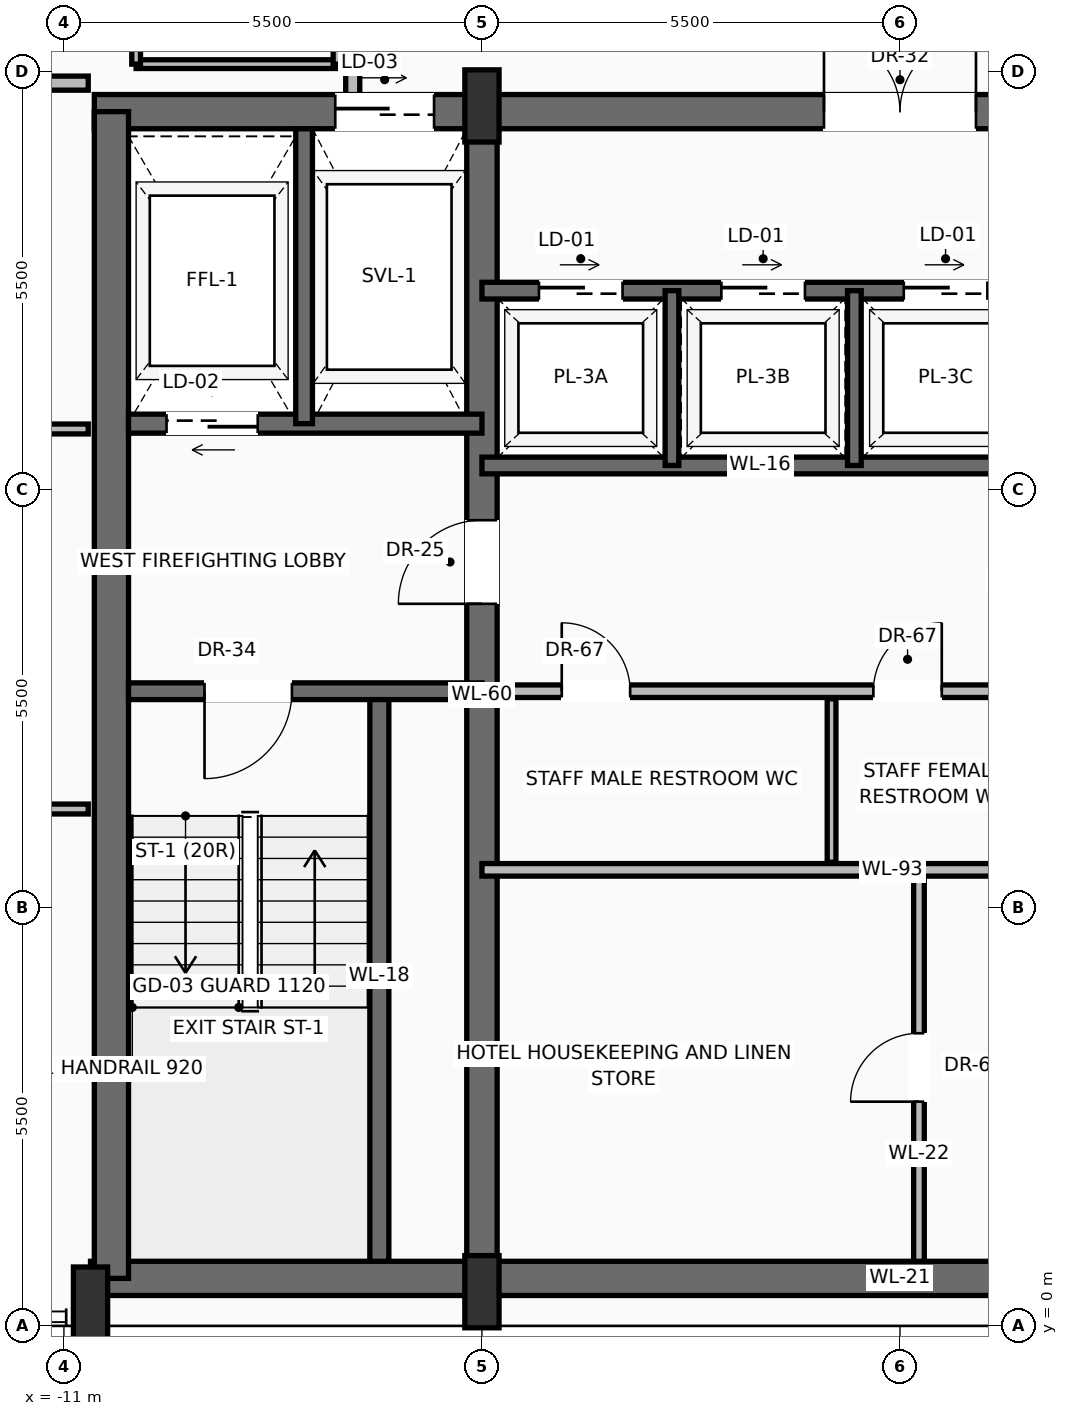
"""IFC4 building model, lengths in metres.
Left out: names, types, materials, properties, quantities, classifications, styles, units other than length and angle.
Written with IfcOpenShell. Run it as: python <this file> out.ifc"""

import sys

from ifc_helpers import new_model, si_unit, direction, frame, frame_2d, origin, origin_2d, place, context, subcontext, project, spatial, rectangle, extrude, source, transform, mapped, element, fill, save


model = new_model("IFC4")
c1 = context("Model", 3, precision=1e-05, world=origin(), true_north=direction((0.0, 1.0)))
c2 = subcontext(c1, "Body", "Model", "MODEL_VIEW")
j1 = project(units=[si_unit("LENGTHUNIT", "METRE"), si_unit("PLANEANGLEUNIT", "RADIAN")], contexts=[c1])
p1 = place(None, origin())
s1 = spatial("IfcSite", under=j1, at=p1, CompositionType="ELEMENT")
p2 = place(p1, origin())
s2 = spatial("IfcBuilding", under=s1, at=p2, CompositionType="ELEMENT")
p3 = place(p2, frame((0.0, 0.0, 286.8)))
s3 = spatial("IfcBuildingStorey", under=s2, at=p3, CompositionType="ELEMENT", Elevation=286.8)
p4 = place(p3, frame((-10.65, 0.625, 0.0), z_axis=(0.0, 0.0, 1.0), x_axis=(1.0, 0.0, 0.0)))
e1 = element("IfcWall", 1, at=p4, inside=s3, PredefinedType="SHEAR", context=c2, shape_type="SweptSolid", body=[
    extrude(rectangle(XDim=21.3, YDim=0.45, at=frame_2d((10.65, 0.0))), origin(), (0.0, 0.0, 1.0), 3.24),
])
p5 = place(p3, frame((-10.6, 15.975, 0.0), z_axis=(0.0, 0.0, 1.0), x_axis=(1.0, 0.0, 0.0)))
e2 = element("IfcWall", 2, at=p5, inside=s3, PredefinedType="SHEAR", context=c2, shape_type="SweptSolid", body=[
    extrude(rectangle(XDim=21.2, YDim=0.45, at=frame_2d((10.6, 0.0))), origin(), (0.0, 0.0, 1.0), 3.24),
])
p6 = place(p5, frame((3.17, 0.0, 0.0)))
e3 = element("IfcOpeningElement", 3, at=p6, cuts=e2, PredefinedType="OPENING", context=c2, shape_type="SweptSolid", body=[
    extrude(rectangle(XDim=1.3, YDim=2.3, at=frame_2d((0.65, 1.15))), frame((0.0, 0.235, 0.0), z_axis=(0.0, -1.0, 0.0), x_axis=(1.0, 0.0, 0.0)), (0.0, 0.0, 1.0), 0.47),
])
p7 = place(p5, frame((9.6, 0.0, 0.0)))
e4 = element("IfcOpeningElement", 4, at=p7, cuts=e2, PredefinedType="OPENING", context=c2, shape_type="SweptSolid", body=[
    extrude(rectangle(XDim=2.0, YDim=2.4, at=frame_2d((1.0, 1.2))), frame((0.0, 0.235, 0.0), z_axis=(0.0, -1.0, 0.0), x_axis=(1.0, 0.0, 0.0)), (0.0, 0.0, 1.0), 0.47),
])
p8 = place(p3, frame((-10.375, 0.625, 0.0), z_axis=(0.0, 0.0, 1.0), x_axis=(0.0, 1.0, 0.0)))
e5 = element("IfcWall", 5, at=p8, inside=s3, PredefinedType="SHEAR", context=c2, shape_type="SweptSolid", body=[
    extrude(rectangle(XDim=15.35, YDim=0.45, at=frame_2d((7.675, 0.0))), origin(), (0.0, 0.0, 1.0), 3.24),
])
p9 = place(p3, frame((-5.5, 0.625, 0.0), z_axis=(0.0, 0.0, 1.0), x_axis=(0.0, 1.0, 0.0)))
e6 = element("IfcWall", 6, at=p9, inside=s3, PredefinedType="SHEAR", context=c2, shape_type="SweptSolid", body=[
    extrude(rectangle(XDim=15.35, YDim=0.4, at=frame_2d((7.675, 0.0))), origin(), (0.0, 0.0, 1.0), 3.24),
])
p10 = place(p9, frame((8.875, 0.0, 0.0)))
e7 = element("IfcOpeningElement", 7, at=p10, cuts=e6, PredefinedType="OPENING", context=c2, shape_type="SweptSolid", body=[
    extrude(rectangle(XDim=1.1, YDim=2.2, at=frame_2d((0.55, 1.1))), frame((0.0, 0.21, 0.0), z_axis=(0.0, -1.0, 0.0), x_axis=(1.0, 0.0, 0.0)), (0.0, 0.0, 1.0), 0.42),
])
m1 = source(origin(), c2, "Body", "SweptSolid", [
    extrude(rectangle(XDim=0.45, YDim=0.95, at=origin_2d()), origin(), (0.0, 0.0, 1.0), 3.45),
])
for number, where, z_axis, x_axis in (
    (8, (-10.65, 0.3, 0.0), (0.0, 0.0, 1.0), (1.0, 0.0, 0.0)),
    (9, (-5.5, 0.45, 0.0), (0.0, 0.0, 1.0), (1.0, 0.0, 0.0)),
    (10, (-5.5, 16.05, 0.0), (0.0, 0.0, 1.0), (1.0, 0.0, 0.0)),
):
    element("IfcColumn", number, at=place(p3, frame(where, z_axis=z_axis, x_axis=x_axis)), inside=s3, PredefinedType="PILASTER", context=c2, shape_type="MappedRepresentation", body=[
        mapped(m1, transform((0.0, 0.0, 0.0), scale=1.0)),
    ])
p11 = place(p3, frame((-18.148, 13.993, 0.0), z_axis=(0.0, 0.0, 1.0), x_axis=(0.498516004102, 0.866880495601, 0.0)))
e11 = element("IfcWall", 11, at=p11, inside=s3, PredefinedType="SOLIDWALL", context=c2, shape_type="SweptSolid", body=[
    extrude(rectangle(XDim=20.236, YDim=0.28, at=frame_2d((10.118, 0.0))), origin(), (0.0, 0.0, 1.0), 2.82),
])
p12 = place(p11, frame((4.857, 0.0, 0.0)))
e12 = element("IfcOpeningElement", 12, at=p12, cuts=e11, PredefinedType="OPENING", context=c2, shape_type="SweptSolid", body=[
    extrude(rectangle(XDim=1.6, YDim=2.35, at=frame_2d((0.8, 1.175))), frame((0.0, 0.15, 0.0), z_axis=(0.0, -1.0, 0.0), x_axis=(1.0, 0.0, 0.0)), (0.0, 0.0, 1.0), 0.3),
])
p13 = place(p11, frame((13.761, 0.0, 0.9)))
e13 = element("IfcOpeningElement", 13, at=p13, cuts=e11, PredefinedType="OPENING", context=c2, shape_type="SweptSolid", body=[
    extrude(rectangle(XDim=1.55, YDim=1.75, at=frame_2d((0.775, 0.875))), frame((0.0, 0.15, 0.0), z_axis=(0.0, -1.0, 0.0), x_axis=(1.0, 0.0, 0.0)), (0.0, 0.0, 1.0), 0.3),
])
p14 = place(p3, frame((-6.85, 0.85, 0.0), z_axis=(0.0, 0.0, 1.0), x_axis=(0.0, 1.0, 0.0)))
e14 = element("IfcWall", 14, at=p14, inside=s3, PredefinedType="SOLIDWALL", context=c2, shape_type="SweptSolid", body=[
    extrude(rectangle(XDim=7.5, YDim=0.25, at=frame_2d((3.75, 0.0))), origin(), (0.0, 0.0, 1.0), 3.24),
])
p15 = place(p3, frame((-5.5, 8.35, 0.0), z_axis=(0.0, 0.0, 1.0), x_axis=(-1.0, 0.0, 0.0)))
e15 = element("IfcWall", 15, at=p15, inside=s3, PredefinedType="SOLIDWALL", context=c2, shape_type="SweptSolid", body=[
    extrude(rectangle(XDim=4.65, YDim=0.22, at=frame_2d((2.325, 0.0))), origin(), (0.0, 0.0, 1.0), 3.24),
])
p16 = place(p15, frame((2.5, 0.0, 0.0)))
e16 = element("IfcOpeningElement", 16, at=p16, cuts=e15, PredefinedType="OPENING", context=c2, shape_type="SweptSolid", body=[
    extrude(rectangle(XDim=1.15, YDim=2.2, at=frame_2d((0.575, 1.1))), frame((0.0, 0.12, 0.0), z_axis=(0.0, -1.0, 0.0), x_axis=(1.0, 0.0, 0.0)), (0.0, 0.0, 1.0), 0.24),
])
p17 = place(p3, frame((-5.5, 11.87, 0.0), z_axis=(0.0, 0.0, 1.0), x_axis=(-1.0, 0.0, 0.0)))
e17 = element("IfcWall", 17, at=p17, inside=s3, PredefinedType="SOLIDWALL", context=c2, shape_type="SweptSolid", body=[
    extrude(rectangle(XDim=4.65, YDim=0.25, at=frame_2d((2.325, 0.0))), origin(), (0.0, 0.0, 1.0), 3.24),
])
p18 = place(p17, frame((2.95, 0.0, 0.0)))
e18 = element("IfcOpeningElement", 18, at=p18, cuts=e17, PredefinedType="OPENING", context=c2, shape_type="SweptSolid", body=[
    extrude(rectangle(XDim=1.2, YDim=2.25, at=frame_2d((0.6, 1.125))), frame((0.0, 0.135, 0.0), z_axis=(0.0, -1.0, 0.0), x_axis=(1.0, 0.0, 0.0)), (0.0, 0.0, 1.0), 0.27),
])
p19 = place(p3, frame((-7.84, 11.87, 0.0), z_axis=(0.0, 0.0, 1.0), x_axis=(0.0, 1.0, 0.0)))
e19 = element("IfcWall", 19, at=p19, inside=s3, PredefinedType="SOLIDWALL", context=c2, shape_type="SweptSolid", body=[
    extrude(rectangle(XDim=3.88, YDim=0.22, at=frame_2d((1.94, 0.0))), origin(), (0.0, 0.0, 1.0), 3.24),
])
p20 = place(p3, frame((-5.5, 6.0, 0.0), z_axis=(0.0, 0.0, 1.0), x_axis=(1.0, 0.0, 0.0)))
e20 = element("IfcWall", 20, at=p20, inside=s3, PredefinedType="PARTITIONING", context=c2, shape_type="SweptSolid", body=[
    extrude(rectangle(XDim=10.8, YDim=0.165, at=frame_2d((5.4, 0.0))), origin(), (0.0, 0.0, 1.0), 3.232),
])
p21 = place(p20, frame((7.7, 0.0, 0.0)))
e21 = element("IfcOpeningElement", 21, at=p21, cuts=e20, PredefinedType="OPENING", context=c2, shape_type="SweptSolid", body=[
    extrude(rectangle(XDim=0.9, YDim=2.1, at=frame_2d((0.45, 1.05))), frame((0.0, 0.093, 0.0), z_axis=(0.0, -1.0, 0.0), x_axis=(1.0, 0.0, 0.0)), (0.0, 0.0, 1.0), 0.185),
])
p22 = place(p3, frame((0.25, 0.85, 0.0), z_axis=(0.0, 0.0, 1.0), x_axis=(0.0, 1.0, 0.0)))
e22 = element("IfcWall", 22, at=p22, inside=s3, PredefinedType="PARTITIONING", context=c2, shape_type="SweptSolid", body=[
    extrude(rectangle(XDim=5.03, YDim=0.14, at=frame_2d((2.515, 0.0))), origin(), (0.0, 0.0, 1.0), 3.232),
])
p23 = place(p22, frame((2.1, 0.0, 0.0)))
e23 = element("IfcOpeningElement", 23, at=p23, cuts=e22, PredefinedType="OPENING", context=c2, shape_type="SweptSolid", body=[
    extrude(rectangle(XDim=0.9, YDim=2.1, at=frame_2d((0.45, 1.05))), frame((0.0, 0.08, 0.0), z_axis=(0.0, -1.0, 0.0), x_axis=(1.0, 0.0, 0.0)), (0.0, 0.0, 1.0), 0.16),
])
p24 = place(p3, frame((-5.3, 8.35, 0.0), z_axis=(0.0, 0.0, 1.0), x_axis=(1.0, 0.0, 0.0)))
e24 = element("IfcWall", 24, at=p24, inside=s3, PredefinedType="PARTITIONING", context=c2, shape_type="SweptSolid", body=[
    extrude(rectangle(XDim=7.12, YDim=0.165, at=frame_2d((3.56, 0.0))), origin(), (0.0, 0.0, 1.0), 3.232),
])
p25 = place(p24, frame((0.85, 0.0, 0.0)))
e25 = element("IfcOpeningElement", 25, at=p25, cuts=e24, PredefinedType="OPENING", context=c2, shape_type="SweptSolid", body=[
    extrude(rectangle(XDim=0.9, YDim=2.1, at=frame_2d((0.45, 1.05))), frame((0.0, 0.093, 0.0), z_axis=(0.0, -1.0, 0.0), x_axis=(1.0, 0.0, 0.0)), (0.0, 0.0, 1.0), 0.185),
])
p26 = place(p24, frame((4.95, 0.0, 0.0)))
e26 = element("IfcOpeningElement", 26, at=p26, cuts=e24, PredefinedType="OPENING", context=c2, shape_type="SweptSolid", body=[
    extrude(rectangle(XDim=0.9, YDim=2.1, at=frame_2d((0.45, 1.05))), frame((0.0, 0.093, 0.0), z_axis=(0.0, -1.0, 0.0), x_axis=(1.0, 0.0, 0.0)), (0.0, 0.0, 1.0), 0.185),
])
p27 = place(p3, frame((-0.9, 6.1, 0.0), z_axis=(0.0, 0.0, 1.0), x_axis=(0.0, 1.0, 0.0)))
e27 = element("IfcWall", 27, at=p27, inside=s3, PredefinedType="PARTITIONING", context=c2, shape_type="SweptSolid", body=[
    extrude(rectangle(XDim=2.15, YDim=0.115, at=frame_2d((1.075, 0.0))), origin(), (0.0, 0.0, 1.0), 3.232),
])
p28 = place(p3, frame((-5.5, 11.32, 0.0), z_axis=(0.0, 0.0, 1.0), x_axis=(1.0, 0.0, 0.0)))
e28 = element("IfcWall", 28, at=p28, inside=s3, PredefinedType="SOLIDWALL", context=c2, shape_type="SweptSolid", body=[
    extrude(rectangle(XDim=7.32, YDim=0.22, at=frame_2d((3.66, 0.0))), origin(), (0.0, 0.0, 1.0), 3.24),
])
p29 = place(p3, frame((-5.5, 13.62, 0.0), z_axis=(0.0, 0.0, 1.0), x_axis=(1.0, 0.0, 0.0)))
e29 = element("IfcWall", 29, at=p29, inside=s3, PredefinedType="SOLIDWALL", context=c2, shape_type="SweptSolid", body=[
    extrude(rectangle(XDim=7.32, YDim=0.22, at=frame_2d((3.66, 0.0))), origin(), (0.0, 0.0, 1.0), 3.24),
])
p30 = place(p29, frame((0.75, 0.0, 0.0)))
e30 = element("IfcOpeningElement", 30, at=p30, cuts=e29, PredefinedType="OPENING", context=c2, shape_type="SweptSolid", body=[
    extrude(rectangle(XDim=1.1, YDim=2.2, at=frame_2d((0.55, 1.1))), frame((0.0, 0.12, 0.0), z_axis=(0.0, -1.0, 0.0), x_axis=(1.0, 0.0, 0.0)), (0.0, 0.0, 1.0), 0.24),
])
p31 = place(p29, frame((3.15, 0.0, 0.0)))
e31 = element("IfcOpeningElement", 31, at=p31, cuts=e29, PredefinedType="OPENING", context=c2, shape_type="SweptSolid", body=[
    extrude(rectangle(XDim=1.1, YDim=2.2, at=frame_2d((0.55, 1.1))), frame((0.0, 0.12, 0.0), z_axis=(0.0, -1.0, 0.0), x_axis=(1.0, 0.0, 0.0)), (0.0, 0.0, 1.0), 0.24),
])
p32 = place(p29, frame((5.55, 0.0, 0.0)))
e32 = element("IfcOpeningElement", 32, at=p32, cuts=e29, PredefinedType="OPENING", context=c2, shape_type="SweptSolid", body=[
    extrude(rectangle(XDim=1.1, YDim=2.2, at=frame_2d((0.55, 1.1))), frame((0.0, 0.12, 0.0), z_axis=(0.0, -1.0, 0.0), x_axis=(1.0, 0.0, 0.0)), (0.0, 0.0, 1.0), 0.24),
])
for number, where, z_axis, x_axis in (
    (33, (-3.0, 11.32, 0.0), (0.0, 0.0, 1.0), (0.0, 1.0, 0.0)),
    (34, (-0.6, 11.32, 0.0), (0.0, 0.0, 1.0), (0.0, 1.0, 0.0)),
):
    element("IfcWall", number, at=place(p3, frame(where, z_axis=z_axis, x_axis=x_axis)), inside=s3, PredefinedType="SOLIDWALL", context=c2, shape_type="SweptSolid", body=[
        extrude(rectangle(XDim=2.3, YDim=0.18, at=frame_2d((1.15, 0.0))), origin(), (0.0, 0.0, 1.0), 3.24),
    ])
p33 = place(p3, frame((-7.2, 16.2, 0.0), z_axis=(0.0, 0.0, 1.0), x_axis=(0.0, 1.0, 0.0)))
e35 = element("IfcWall", 35, at=p33, inside=s3, PredefinedType="PARTITIONING", context=c2, shape_type="SweptSolid", body=[
    extrude(rectangle(XDim=10.4, YDim=0.185, at=frame_2d((5.2, 0.0))), origin(), (0.0, 0.0, 1.0), 3.232),
])
p34 = place(p33, frame((3.18, 0.0, 0.0)))
e36 = element("IfcOpeningElement", 36, at=p34, cuts=e35, PredefinedType="OPENING", context=c2, shape_type="SweptSolid", body=[
    extrude(rectangle(XDim=1.05, YDim=2.25, at=frame_2d((0.525, 1.125))), frame((0.0, 0.103, 0.0), z_axis=(0.0, -1.0, 0.0), x_axis=(1.0, 0.0, 0.0)), (0.0, 0.0, 1.0), 0.205),
])
p35 = place(p33, frame((7.712, 0.0, 0.0)))
e37 = element("IfcOpeningElement", 37, at=p35, cuts=e35, PredefinedType="OPENING", context=c2, shape_type="SweptSolid", body=[
    extrude(rectangle(XDim=1.05, YDim=2.25, at=frame_2d((0.525, 1.125))), frame((0.0, 0.103, 0.0), z_axis=(0.0, -1.0, 0.0), x_axis=(1.0, 0.0, 0.0)), (0.0, 0.0, 1.0), 0.205),
])
p36 = place(p3, frame((-16.943, 16.35, 0.0), z_axis=(0.0, 0.0, 1.0), x_axis=(1.0, 0.0, 0.0)))
e38 = element("IfcWall", 38, at=p36, inside=s3, PredefinedType="PARTITIONING", context=c2, shape_type="SweptSolid", body=[
    extrude(rectangle(XDim=6.263, YDim=0.185, at=frame_2d((3.132, 0.0))), origin(), (0.0, 0.0, 1.0), 3.232),
])
p37 = place(p36, frame((3.444, 0.0, 0.0)))
e39 = element("IfcOpeningElement", 39, at=p37, cuts=e38, PredefinedType="OPENING", context=c2, shape_type="SweptSolid", body=[
    extrude(rectangle(XDim=1.05, YDim=2.25, at=frame_2d((0.525, 1.125))), frame((0.0, 0.103, 0.0), z_axis=(0.0, -1.0, 0.0), x_axis=(1.0, 0.0, 0.0)), (0.0, 0.0, 1.0), 0.205),
])
p38 = place(p3, frame((-22.435, 6.8, 0.0), z_axis=(0.0, 0.0, 1.0), x_axis=(1.0, 0.0, 0.0)))
e40 = element("IfcWall", 40, at=p38, inside=s3, PredefinedType="PARTITIONING", context=c2, shape_type="SweptSolid", body=[
    extrude(rectangle(XDim=11.755, YDim=0.13, at=frame_2d((5.877, 0.0))), origin(), (0.0, 0.0, 1.0), 3.232),
])
p39 = place(p38, frame((4.849, 0.0, 0.0)))
e41 = element("IfcOpeningElement", 41, at=p39, cuts=e40, PredefinedType="OPENING", context=c2, shape_type="SweptSolid", body=[
    extrude(rectangle(XDim=0.95, YDim=2.2, at=frame_2d((0.475, 1.1))), frame((0.0, 0.075, 0.0), z_axis=(0.0, -1.0, 0.0), x_axis=(1.0, 0.0, 0.0)), (0.0, 0.0, 1.0), 0.15),
])
p40 = place(p3, frame((-19.56, 11.8, 0.0), z_axis=(0.0, 0.0, 1.0), x_axis=(1.0, 0.0, 0.0)))
e42 = element("IfcWall", 42, at=p40, inside=s3, PredefinedType="PARTITIONING", context=c2, shape_type="SweptSolid", body=[
    extrude(rectangle(XDim=8.88, YDim=0.13, at=frame_2d((4.44, 0.0))), origin(), (0.0, 0.0, 1.0), 3.232),
])
p41 = place(p40, frame((3.555, 0.0, 0.0)))
e43 = element("IfcOpeningElement", 43, at=p41, cuts=e42, PredefinedType="OPENING", context=c2, shape_type="SweptSolid", body=[
    extrude(rectangle(XDim=0.95, YDim=2.2, at=frame_2d((0.475, 1.1))), frame((0.0, 0.075, 0.0), z_axis=(0.0, -1.0, 0.0), x_axis=(1.0, 0.0, 0.0)), (0.0, 0.0, 1.0), 0.15),
])
p42 = place(p3, frame((-10.05, 16.6, 0.0), z_axis=(0.0, 0.0, 1.0), x_axis=(1.0, 0.0, 0.0)))
e44 = element("IfcWall", 44, at=p42, inside=s3, PredefinedType="PARTITIONING", context=c2, shape_type="SweptSolid", body=[
    extrude(rectangle(XDim=2.65, YDim=0.115, at=frame_2d((1.325, 0.0))), origin(), (0.0, 0.0, 1.0), 3.232),
])
p43 = place(p3, frame((-10.05, 16.6, 0.0), z_axis=(0.0, 0.0, 1.0), x_axis=(0.0, 1.0, 0.0)))
e45 = element("IfcWall", 45, at=p43, inside=s3, PredefinedType="PARTITIONING", context=c2, shape_type="SweptSolid", body=[
    extrude(rectangle(XDim=2.4, YDim=0.115, at=frame_2d((1.2, 0.0))), origin(), (0.0, 0.0, 1.0), 3.232),
])
p44 = place(p43, frame((0.75, 0.0, 0.0)))
e46 = element("IfcOpeningElement", 46, at=p44, cuts=e45, PredefinedType="OPENING", context=c2, shape_type="SweptSolid", body=[
    extrude(rectangle(XDim=0.9, YDim=2.15, at=frame_2d((0.45, 1.075))), frame((0.0, 0.067, 0.0), z_axis=(0.0, -1.0, 0.0), x_axis=(1.0, 0.0, 0.0)), (0.0, 0.0, 1.0), 0.135),
])
p45 = place(p3, frame((-7.4, 16.6, 0.0), z_axis=(0.0, 0.0, 1.0), x_axis=(0.0, 1.0, 0.0)))
e47 = element("IfcWall", 47, at=p45, inside=s3, PredefinedType="PARTITIONING", context=c2, shape_type="SweptSolid", body=[
    extrude(rectangle(XDim=2.4, YDim=0.115, at=frame_2d((1.2, 0.0))), origin(), (0.0, 0.0, 1.0), 3.232),
])
m2 = source(origin(), c2, "Body", "SweptSolid", [
    extrude(rectangle(XDim=1.15, YDim=2.2, at=frame_2d((0.575, 1.1))), frame((0.0, 0.025, 0.0), z_axis=(0.0, -1.0, 0.0), x_axis=(1.0, 0.0, 0.0)), (0.0, 0.0, 1.0), 0.05),
])
p46 = place(p16, origin())
e48 = element("IfcDoor", 48, at=p46, inside=s3, OperationType="SINGLE_SWING_RIGHT", PredefinedType="DOOR", context=c2, shape_type="MappedRepresentation", body=[
    mapped(m2, transform((0.0, 0.0, 0.0), scale=1.0)),
])
fill(e16, e48)
m3 = source(origin(), c2, "Body", "SweptSolid", [
    extrude(rectangle(XDim=1.1, YDim=2.2, at=frame_2d((0.55, 1.1))), frame((0.0, 0.025, 0.0), z_axis=(0.0, -1.0, 0.0), x_axis=(1.0, 0.0, 0.0)), (0.0, 0.0, 1.0), 0.05),
])
p47 = place(p10, origin())
e49 = element("IfcDoor", 49, at=p47, inside=s3, OperationType="SINGLE_SWING_LEFT", PredefinedType="DOOR", context=c2, shape_type="MappedRepresentation", body=[
    mapped(m3, transform((0.0, 0.0, 0.0), scale=1.0)),
])
fill(e7, e49)
m4 = source(origin(), c2, "Body", "SweptSolid", [
    extrude(rectangle(XDim=1.2, YDim=2.25, at=frame_2d((0.6, 1.125))), frame((0.0, 0.025, 0.0), z_axis=(0.0, -1.0, 0.0), x_axis=(1.0, 0.0, 0.0)), (0.0, 0.0, 1.0), 0.05),
])
p48 = place(p18, origin())
e50 = element("IfcDoor", 50, at=p48, inside=s3, OperationType="SLIDING_TO_LEFT", PredefinedType="DOOR", context=c2, shape_type="MappedRepresentation", body=[
    mapped(m4, transform((0.0, 0.0, 0.0), scale=1.0)),
])
fill(e18, e50)
m5 = source(origin(), c2, "Body", "SweptSolid", [
    extrude(rectangle(XDim=1.3, YDim=2.3, at=frame_2d((0.65, 1.15))), frame((0.0, 0.025, 0.0), z_axis=(0.0, -1.0, 0.0), x_axis=(1.0, 0.0, 0.0)), (0.0, 0.0, 1.0), 0.05),
])
p49 = place(p6, origin())
e51 = element("IfcDoor", 51, at=p49, inside=s3, OperationType="SLIDING_TO_RIGHT", PredefinedType="DOOR", context=c2, shape_type="MappedRepresentation", body=[
    mapped(m5, transform((0.0, 0.0, 0.0), scale=1.0)),
])
fill(e3, e51)
m6 = source(origin(), c2, "Body", "SweptSolid", [
    extrude(rectangle(XDim=2.0, YDim=2.4, at=frame_2d((1.0, 1.2))), frame((0.0, 0.025, 0.0), z_axis=(0.0, -1.0, 0.0), x_axis=(1.0, 0.0, 0.0)), (0.0, 0.0, 1.0), 0.05),
])
p50 = place(p7, origin())
e52 = element("IfcDoor", 52, at=p50, inside=s3, OperationType="DOUBLE_DOOR_SINGLE_SWING", PredefinedType="DOOR", context=c2, shape_type="MappedRepresentation", body=[
    mapped(m6, transform((0.0, 0.0, 0.0), scale=1.0)),
])
fill(e4, e52)
m7 = source(origin(), c2, "Body", "SweptSolid", [
    extrude(rectangle(XDim=0.9, YDim=2.1, at=frame_2d((0.45, 1.05))), frame((0.0, 0.025, 0.0), z_axis=(0.0, -1.0, 0.0), x_axis=(1.0, 0.0, 0.0)), (0.0, 0.0, 1.0), 0.05),
])
p51 = place(p23, origin())
e53 = element("IfcDoor", 53, at=p51, inside=s3, OperationType="SINGLE_SWING_LEFT", PredefinedType="DOOR", context=c2, shape_type="MappedRepresentation", body=[
    mapped(m7, transform((0.0, 0.0, 0.0), scale=1.0)),
])
fill(e23, e53)
p52 = place(p25, origin())
e54 = element("IfcDoor", 54, at=p52, inside=s3, OperationType="SINGLE_SWING_LEFT", PredefinedType="DOOR", context=c2, shape_type="MappedRepresentation", body=[
    mapped(m7, transform((0.0, 0.0, 0.0), scale=1.0)),
])
fill(e25, e54)
p53 = place(p26, origin())
e55 = element("IfcDoor", 55, at=p53, inside=s3, OperationType="SINGLE_SWING_RIGHT", PredefinedType="DOOR", context=c2, shape_type="MappedRepresentation", body=[
    mapped(m7, transform((0.0, 0.0, 0.0), scale=1.0)),
])
fill(e26, e55)
m8 = source(origin(), c2, "Body", "SweptSolid", [
    extrude(rectangle(XDim=1.1, YDim=2.2, at=frame_2d((0.55, 1.1))), frame((0.0, 0.025, 0.0), z_axis=(0.0, -1.0, 0.0), x_axis=(1.0, 0.0, 0.0)), (0.0, 0.0, 1.0), 0.05),
])
p54 = place(p30, origin())
e56 = element("IfcDoor", 56, at=p54, inside=s3, OperationType="SLIDING_TO_RIGHT", PredefinedType="DOOR", context=c2, shape_type="MappedRepresentation", body=[
    mapped(m8, transform((0.0, 0.0, 0.0), scale=1.0)),
])
fill(e30, e56)
p55 = place(p31, origin())
e57 = element("IfcDoor", 57, at=p55, inside=s3, OperationType="SLIDING_TO_RIGHT", PredefinedType="DOOR", context=c2, shape_type="MappedRepresentation", body=[
    mapped(m8, transform((0.0, 0.0, 0.0), scale=1.0)),
])
fill(e31, e57)
p56 = place(p32, origin())
e58 = element("IfcDoor", 58, at=p56, inside=s3, OperationType="SLIDING_TO_RIGHT", PredefinedType="DOOR", context=c2, shape_type="MappedRepresentation", body=[
    mapped(m8, transform((0.0, 0.0, 0.0), scale=1.0)),
])
fill(e32, e58)
save(model, sys.argv[1])
